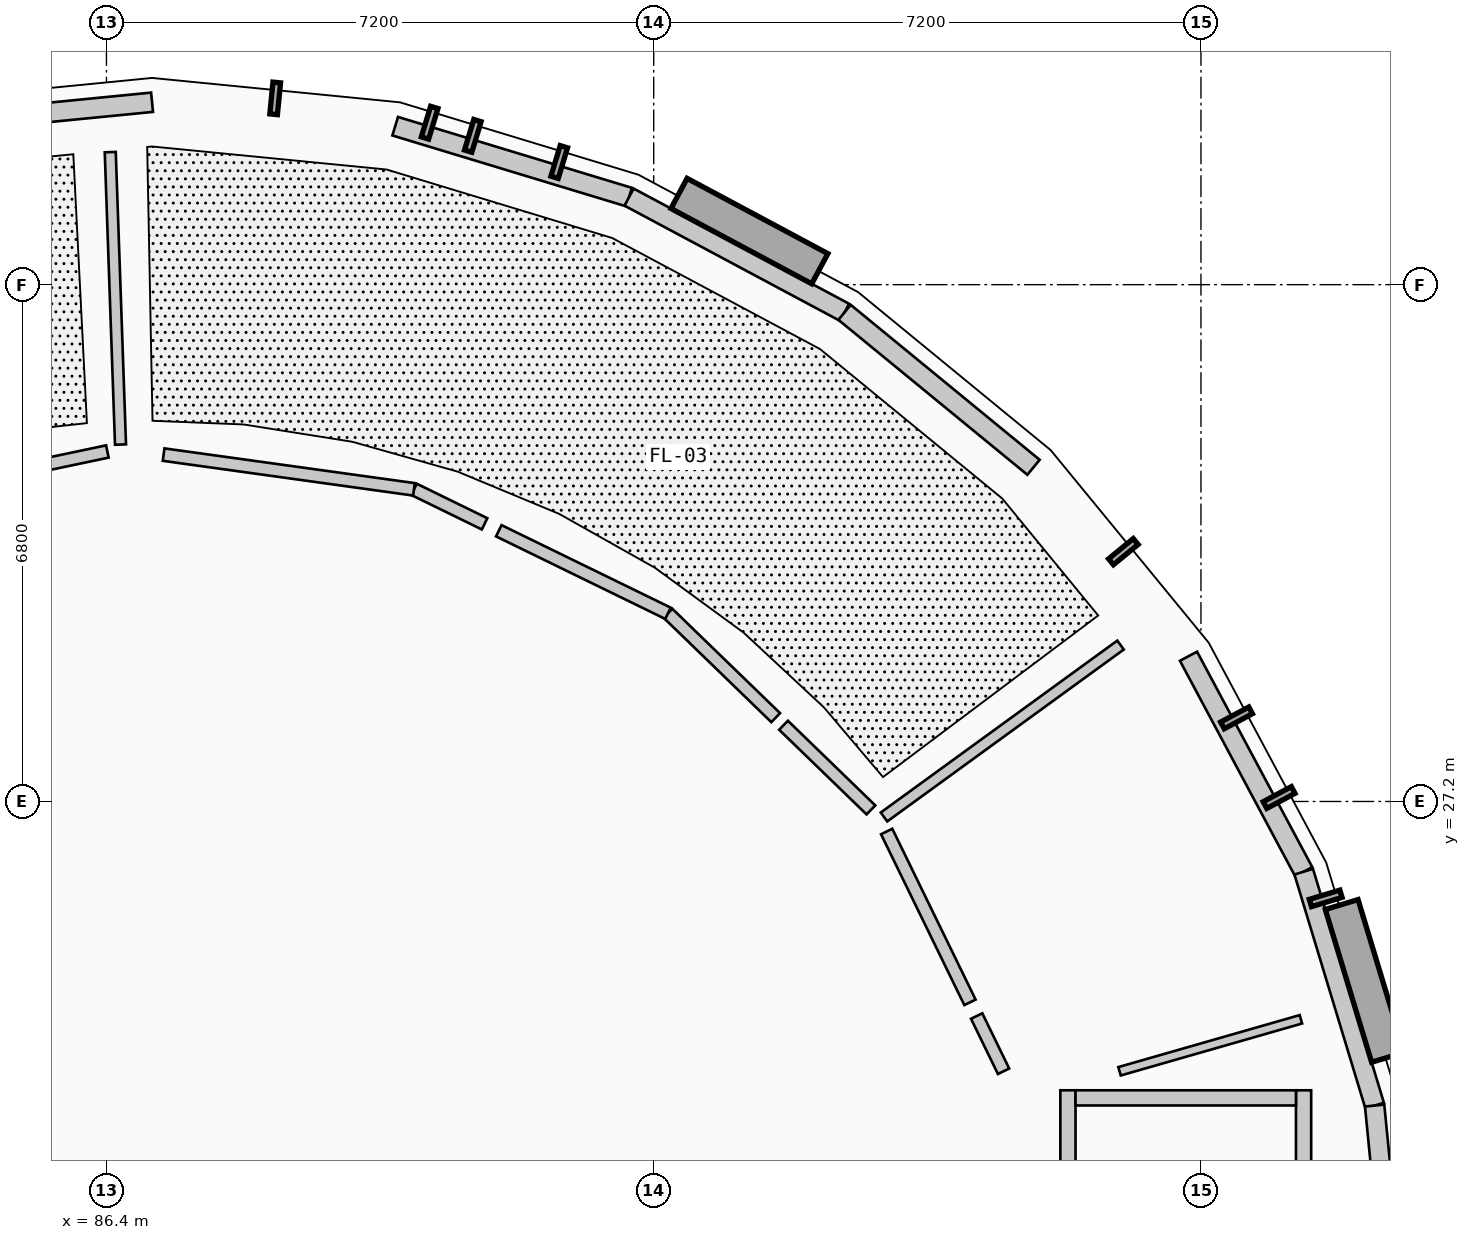
"""IFC4 building model, lengths in metres.
Left out: names, types, materials, properties, quantities, classifications, styles, units other than length and angle.
Written with IfcOpenShell. Run it as: python <this file> out.ifc"""

import sys

from ifc_helpers import new_model, si_unit, direction, frame, frame_2d, origin, origin_2d, place, context, subcontext, project, spatial, rectangle, circle, extrude, element, fill, save


model = new_model("IFC4")
c1 = context("Model", 3, precision=1e-05, world=origin(), true_north=direction((0.0, 1.0)))
c2 = subcontext(c1, "Body", "Model", "MODEL_VIEW")
j1 = project(units=[si_unit("LENGTHUNIT", "METRE"), si_unit("PLANEANGLEUNIT", "RADIAN")], contexts=[c1])
p1 = place(None, origin())
s1 = spatial("IfcSite", under=j1, at=p1, CompositionType="ELEMENT")
p2 = place(p1, origin())
s2 = spatial("IfcBuilding", under=s1, at=p2, CompositionType="ELEMENT")
p3 = place(p2, frame((0.0, 0.0, 4.55)))
s3 = spatial("IfcBuildingStorey", under=s2, at=p3, CompositionType="ELEMENT", Elevation=4.55)
for number, where, z_axis, x_axis in (
    (1, (101.671, 26.077, 0.0), (0.0, 0.0, 1.0), (1.0, 0.0, 0.0)),
    (2, (98.229, 31.229, 0.0), (0.0, 0.0, 1.0), (1.0, 0.0, 0.0)),
    (3, (93.077, 34.671, 0.0), (0.0, 0.0, 1.0), (1.0, 0.0, 0.0)),
    (4, (87.0, 35.88, 0.0), (0.0, 0.0, 1.0), (1.0, 0.0, 0.0)),
    (5, (97.92, 24.523, 0.0), (0.0, 0.0, 1.0), (1.0, 0.0, 0.0)),
    (6, (95.358, 28.358, 0.0), (0.0, 0.0, 1.0), (1.0, 0.0, 0.0)),
    (7, (91.523, 30.92, 0.0), (0.0, 0.0, 1.0), (1.0, 0.0, 0.0)),
    (8, (87.0, 31.82, 0.0), (0.0, 0.0, 1.0), (1.0, 0.0, 0.0)),
):
    element("IfcColumn", number, at=place(p3, frame(where, z_axis=z_axis, x_axis=x_axis)), inside=s3, PredefinedType="COLUMN", context=c2, shape_type="SweptSolid", body=[
        extrude(rectangle(XDim=0.315, YDim=0.315, at=origin_2d()), origin(), (0.0, 0.0, 1.0), 4.2),
    ])
for number, where, z_axis, x_axis in (
    (9, (99.834, 32.834, 0.0), (0.0, 0.0, 1.0), (1.0, 0.0, 0.0)),
    (10, (93.946, 36.768, 0.0), (0.0, 0.0, 1.0), (1.0, 0.0, 0.0)),
):
    element("IfcColumn", number, at=place(p3, frame(where, z_axis=z_axis, x_axis=x_axis)), inside=s3, PredefinedType="COLUMN", context=c2, shape_type="SweptSolid", body=[
        extrude(circle(Radius=0.35, at=origin_2d()), origin(), (0.0, 0.0, 1.0), 4.2),
    ])
p4 = place(p3, frame((83.801, 36.085, 0.0), z_axis=(0.0, 0.0, 1.0), x_axis=(0.995188673637, 0.097977057849, 0.0)))
e11 = element("IfcWall", 11, at=p4, inside=s3, PredefinedType="ELEMENTEDWALL", context=c2, shape_type="SweptSolid", body=[
    extrude(rectangle(XDim=3.214, YDim=0.255, at=frame_2d((1.607, 0.0))), origin(), (0.0, 0.0, 1.0), 3.314),
])
p5 = place(p4, frame((1.117, 0.0, 0.85)))
e12 = element("IfcOpeningElement", 12, at=p5, cuts=e11, PredefinedType="OPENING", context=c2, shape_type="SweptSolid", body=[
    extrude(rectangle(XDim=0.98, YDim=1.75, at=frame_2d((0.49, 0.875))), frame((0.0, 0.137, 0.0), z_axis=(0.0, -1.0, 0.0), x_axis=(1.0, 0.0, 0.0)), (0.0, 0.0, 1.0), 0.275),
])
p6 = place(p3, frame((90.199, 36.085, 0.0), z_axis=(0.0, 0.0, 1.0), x_axis=(0.956984161567, -0.29014016356, 0.0)))
e13 = element("IfcWall", 13, at=p6, inside=s3, PredefinedType="ELEMENTEDWALL", context=c2, shape_type="SweptSolid", body=[
    extrude(rectangle(XDim=3.215, YDim=0.255, at=frame_2d((1.607, 0.0))), origin(), (0.0, 0.0, 1.0), 3.314),
])
p7 = place(p6, frame((1.108, 0.0, 0.85)))
e14 = element("IfcOpeningElement", 14, at=p7, cuts=e13, PredefinedType="OPENING", context=c2, shape_type="SweptSolid", body=[
    extrude(rectangle(XDim=1.0, YDim=1.45, at=frame_2d((0.5, 0.725))), frame((0.0, 0.137, 0.0), z_axis=(0.0, -1.0, 0.0), x_axis=(1.0, 0.0, 0.0)), (0.0, 0.0, 1.0), 0.275),
])
p8 = place(p3, frame((93.276, 35.152, 0.0), z_axis=(0.0, 0.0, 1.0), x_axis=(0.881835313523, -0.47155750426, 0.0)))
e15 = element("IfcWall", 15, at=p8, inside=s3, PredefinedType="ELEMENTEDWALL", context=c2, shape_type="SweptSolid", body=[
    extrude(rectangle(XDim=3.215, YDim=0.255, at=frame_2d((1.607, 0.0))), origin(), (0.0, 0.0, 1.0), 3.314),
])
p9 = place(p8, frame((1.107, 0.0, 0.85)))
e16 = element("IfcOpeningElement", 16, at=p9, cuts=e15, PredefinedType="OPENING", context=c2, shape_type="SweptSolid", body=[
    extrude(rectangle(XDim=1.0, YDim=1.75, at=frame_2d((0.5, 0.875))), frame((0.0, 0.137, 0.0), z_axis=(0.0, -1.0, 0.0), x_axis=(1.0, 0.0, 0.0)), (0.0, 0.0, 1.0), 0.275),
])
p10 = place(p3, frame((96.111, 33.636, 0.0), z_axis=(0.0, 0.0, 1.0), x_axis=(0.773165020866, -0.634204896314, 0.0)))
e17 = element("IfcWall", 17, at=p10, inside=s3, PredefinedType="ELEMENTEDWALL", context=c2, shape_type="SweptSolid", body=[
    extrude(rectangle(XDim=3.215, YDim=0.255, at=frame_2d((1.607, 0.0))), origin(), (0.0, 0.0, 1.0), 3.314),
])
p11 = place(p10, frame((1.108, 0.0, 0.85)))
e18 = element("IfcOpeningElement", 18, at=p11, cuts=e17, PredefinedType="OPENING", context=c2, shape_type="SweptSolid", body=[
    extrude(rectangle(XDim=1.0, YDim=2.0, at=frame_2d((0.5, 1.0))), frame((0.0, 0.137, 0.0), z_axis=(0.0, -1.0, 0.0), x_axis=(1.0, 0.0, 0.0)), (0.0, 0.0, 1.0), 0.275),
])
p12 = place(p3, frame((100.636, 29.111, 0.0), z_axis=(0.0, 0.0, 1.0), x_axis=(0.47155750426, -0.881835313523, 0.0)))
e19 = element("IfcWall", 19, at=p12, inside=s3, PredefinedType="ELEMENTEDWALL", context=c2, shape_type="SweptSolid", body=[
    extrude(rectangle(XDim=3.215, YDim=0.255, at=frame_2d((1.607, 0.0))), origin(), (0.0, 0.0, 1.0), 3.314),
])
p13 = place(p12, frame((1.097, 0.0, 0.85)))
e20 = element("IfcOpeningElement", 20, at=p13, cuts=e19, PredefinedType="OPENING", context=c2, shape_type="SweptSolid", body=[
    extrude(rectangle(XDim=1.02, YDim=1.6, at=frame_2d((0.51, 0.8))), frame((0.0, 0.137, 0.0), z_axis=(0.0, -1.0, 0.0), x_axis=(1.0, 0.0, 0.0)), (0.0, 0.0, 1.0), 0.275),
])
p14 = place(p3, frame((102.152, 26.276, 0.0), z_axis=(0.0, 0.0, 1.0), x_axis=(0.29014016356, -0.956984161567, 0.0)))
e21 = element("IfcWall", 21, at=p14, inside=s3, PredefinedType="ELEMENTEDWALL", context=c2, shape_type="SweptSolid", body=[
    extrude(rectangle(XDim=3.215, YDim=0.255, at=frame_2d((1.607, 0.0))), origin(), (0.0, 0.0, 1.0), 3.314),
])
p15 = place(p14, frame((1.083, 0.0, 0.85)))
e22 = element("IfcOpeningElement", 22, at=p15, cuts=e21, PredefinedType="OPENING", context=c2, shape_type="SweptSolid", body=[
    extrude(rectangle(XDim=1.05, YDim=1.35, at=frame_2d((0.525, 0.675))), frame((0.0, 0.137, 0.0), z_axis=(0.0, -1.0, 0.0), x_axis=(1.0, 0.0, 0.0)), (0.0, 0.0, 1.0), 0.275),
])
p16 = place(p3, frame((103.085, 23.199, 0.0), z_axis=(0.0, 0.0, 1.0), x_axis=(0.097977057849, -0.995188673637, 0.0)))
e23 = element("IfcWall", 23, at=p16, inside=s3, PredefinedType="ELEMENTEDWALL", context=c2, shape_type="SweptSolid", body=[
    extrude(rectangle(XDim=3.214, YDim=0.255, at=frame_2d((1.607, 0.0))), origin(), (0.0, 0.0, 1.0), 3.314),
])
p17 = place(p3, frame((99.05, 23.4, 0.0), z_axis=(0.0, 0.0, 1.0), x_axis=(0.0, -1.0, 0.0)))
e24 = element("IfcWall", 24, at=p17, inside=s3, PredefinedType="SHEAR", context=c2, shape_type="SweptSolid", body=[
    extrude(rectangle(XDim=6.8, YDim=0.2, at=frame_2d((3.4, 0.0))), origin(), (0.0, 0.0, 1.0), 3.3),
])
p18 = place(p17, frame((0.38, 0.0, 0.0)))
e25 = element("IfcOpeningElement", 25, at=p18, cuts=e24, PredefinedType="OPENING", context=c2, shape_type="SweptSolid", body=[
    extrude(rectangle(XDim=1.1, YDim=2.15, at=frame_2d((0.55, 1.075))), frame((0.0, 0.11, 0.0), z_axis=(0.0, -1.0, 0.0), x_axis=(1.0, 0.0, 0.0)), (0.0, 0.0, 1.0), 0.22),
])
p19 = place(p3, frame((102.15, 23.4, 0.0), z_axis=(0.0, 0.0, 1.0), x_axis=(0.0, -1.0, 0.0)))
e26 = element("IfcWall", 26, at=p19, inside=s3, PredefinedType="SHEAR", context=c2, shape_type="SweptSolid", body=[
    extrude(rectangle(XDim=6.8, YDim=0.2, at=frame_2d((3.4, 0.0))), origin(), (0.0, 0.0, 1.0), 3.3),
])
p20 = place(p3, frame((99.15, 23.3, 0.0), z_axis=(0.0, 0.0, 1.0), x_axis=(1.0, 0.0, 0.0)))
e27 = element("IfcWall", 27, at=p20, inside=s3, PredefinedType="SHEAR", context=c2, shape_type="SweptSolid", body=[
    extrude(rectangle(XDim=2.9, YDim=0.2, at=frame_2d((1.45, 0.0))), origin(), (0.0, 0.0, 1.0), 3.3),
])
p21 = place(p3, frame((96.63, 26.996, 0.0), z_axis=(0.0, 0.0, 1.0), x_axis=(0.808903444358, 0.587941508745, 0.0)))
e28 = element("IfcWall", 28, at=p21, inside=s3, PredefinedType="PARTITIONING", context=c2, shape_type="SweptSolid", body=[
    extrude(rectangle(XDim=3.847, YDim=0.145, at=frame_2d((1.924, 0.0))), origin(), (0.0, 0.0, 1.0), 3.3),
])
p22 = place(p3, frame((86.585, 31.896, 0.0), z_axis=(0.0, 0.0, 1.0), x_axis=(-0.035065029067, 0.999385032776, 0.0)))
e29 = element("IfcWall", 29, at=p22, inside=s3, PredefinedType="PARTITIONING", context=c2, shape_type="SweptSolid", body=[
    extrude(rectangle(XDim=3.85, YDim=0.145, at=frame_2d((1.925, 0.0))), origin(), (0.0, 0.0, 1.0), 3.3),
])
p23 = place(p3, frame((99.729, 23.65, 0.0), z_axis=(0.0, 0.0, 1.0), x_axis=(0.96127114667, 0.275604395065, 0.0)))
e30 = element("IfcWall", 30, at=p23, inside=s3, PredefinedType="PARTITIONING", context=c2, shape_type="SweptSolid", body=[
    extrude(rectangle(XDim=2.482, YDim=0.115, at=frame_2d((1.241, 0.0))), origin(), (0.0, 0.0, 1.0), 3.3),
])
p24 = place(p3, frame((96.458, 27.089, 0.0), z_axis=(0.0, 0.0, 1.0), x_axis=(-0.718302144199, 0.69573129126, 0.0)))
e31 = element("IfcWall", 31, at=p24, inside=s3, PredefinedType="PARTITIONING", context=c2, shape_type="SweptSolid", body=[
    extrude(rectangle(XDim=1.601, YDim=0.165, at=frame_2d((0.8, 0.0))), origin(), (0.0, 0.0, 1.0), 3.3),
])
p25 = place(p24, frame((0.311, 0.0, 0.0)))
e32 = element("IfcOpeningElement", 32, at=p25, cuts=e31, PredefinedType="OPENING", context=c2, shape_type="SweptSolid", body=[
    extrude(rectangle(XDim=0.98, YDim=2.24, at=frame_2d((0.49, 1.12))), frame((0.0, 0.093, 0.0), z_axis=(0.0, -1.0, 0.0), x_axis=(1.0, 0.0, 0.0)), (0.0, 0.0, 1.0), 0.185),
])
p26 = place(p3, frame((95.205, 28.303, 0.0), z_axis=(0.0, 0.0, 1.0), x_axis=(-0.718155192795, 0.695882977994, 0.0)))
e33 = element("IfcWall", 33, at=p26, inside=s3, PredefinedType="PARTITIONING", context=c2, shape_type="SweptSolid", body=[
    extrude(rectangle(XDim=1.973, YDim=0.165, at=frame_2d((0.987, 0.0))), origin(), (0.0, 0.0, 1.0), 3.3),
])
p27 = place(p3, frame((93.788, 29.676, 0.0), z_axis=(0.0, 0.0, 1.0), x_axis=(-0.898760866849, 0.438439168211, 0.0)))
e34 = element("IfcWall", 34, at=p27, inside=s3, PredefinedType="PARTITIONING", context=c2, shape_type="SweptSolid", body=[
    extrude(rectangle(XDim=2.477, YDim=0.165, at=frame_2d((1.238, 0.0))), origin(), (0.0, 0.0, 1.0), 3.3),
])
p28 = place(p3, frame((91.375, 30.853, 0.0), z_axis=(0.0, 0.0, 1.0), x_axis=(-0.89849821067, 0.438977180982, 0.0)))
e35 = element("IfcWall", 35, at=p28, inside=s3, PredefinedType="PARTITIONING", context=c2, shape_type="SweptSolid", body=[
    extrude(rectangle(XDim=1.034, YDim=0.165, at=frame_2d((0.517, 0.0))), origin(), (0.0, 0.0, 1.0), 3.3),
])
p29 = place(p3, frame((90.446, 31.307, 0.0), z_axis=(0.0, 0.0, 1.0), x_axis=(-0.990511159367, 0.137432322142, 0.0)))
e36 = element("IfcWall", 36, at=p29, inside=s3, PredefinedType="PARTITIONING", context=c2, shape_type="SweptSolid", body=[
    extrude(rectangle(XDim=3.325, YDim=0.165, at=frame_2d((1.663, 0.0))), origin(), (0.0, 0.0, 1.0), 3.3),
])
p30 = place(p3, frame((86.412, 31.805, 0.0), z_axis=(0.0, 0.0, 1.0), x_axis=(-0.978553268449, -0.20599393391, 0.0)))
e37 = element("IfcWall", 37, at=p30, inside=s3, PredefinedType="PARTITIONING", context=c2, shape_type="SweptSolid", body=[
    extrude(rectangle(XDim=3.718, YDim=0.165, at=frame_2d((1.859, 0.0))), origin(), (0.0, 0.0, 1.0), 3.3),
])
p31 = place(p30, frame((1.349, 0.0, 0.0)))
e38 = element("IfcOpeningElement", 38, at=p31, cuts=e37, PredefinedType="OPENING", context=c2, shape_type="SweptSolid", body=[
    extrude(rectangle(XDim=1.02, YDim=2.26, at=frame_2d((0.51, 1.13))), frame((0.0, 0.093, 0.0), z_axis=(0.0, -1.0, 0.0), x_axis=(1.0, 0.0, 0.0)), (0.0, 0.0, 1.0), 0.185),
])
p32 = place(p3, frame((98.203, 23.65, 0.0), z_axis=(0.0, 0.0, 1.0), x_axis=(-0.437525109064, 0.899206193784, 0.0)))
e39 = element("IfcWall", 39, at=p32, inside=s3, PredefinedType="PARTITIONING", context=c2, shape_type="SweptSolid", body=[
    extrude(rectangle(XDim=0.809, YDim=0.165, at=frame_2d((0.404, 0.0))), origin(), (0.0, 0.0, 1.0), 3.3),
])
p33 = place(p3, frame((97.761, 24.557, 0.0), z_axis=(0.0, 0.0, 1.0), x_axis=(-0.438210134554, 0.898872559362, 0.0)))
e40 = element("IfcWall", 40, at=p33, inside=s3, PredefinedType="PARTITIONING", context=c2, shape_type="SweptSolid", body=[
    extrude(rectangle(XDim=2.501, YDim=0.165, at=frame_2d((1.25, 0.0))), origin(), (0.0, 0.0, 1.0), 3.3),
])
p34 = place(p33, frame((0.776, 0.0, 0.0)))
e41 = element("IfcOpeningElement", 41, at=p34, cuts=e40, PredefinedType="OPENING", context=c2, shape_type="SweptSolid", body=[
    extrude(rectangle(XDim=0.95, YDim=2.16, at=frame_2d((0.475, 1.08))), frame((0.0, 0.093, 0.0), z_axis=(0.0, -1.0, 0.0), x_axis=(1.0, 0.0, 0.0)), (0.0, 0.0, 1.0), 0.185),
])
p35 = place(p5, origin())
e42 = element("IfcWindow", 42, at=p35, inside=s3, PartitioningType="SINGLE_PANEL", PredefinedType="WINDOW", context=c2, shape_type="SweptSolid", body=[
    extrude(rectangle(XDim=0.98, YDim=1.75, at=frame_2d((0.49, 0.875))), frame((0.0, 0.03, 0.0), z_axis=(0.0, -1.0, 0.0), x_axis=(1.0, 0.0, 0.0)), (0.0, 0.0, 1.0), 0.06),
])
fill(e12, e42)
p36 = place(p7, origin())
e43 = element("IfcWindow", 43, at=p36, inside=s3, PartitioningType="SINGLE_PANEL", PredefinedType="WINDOW", context=c2, shape_type="SweptSolid", body=[
    extrude(rectangle(XDim=1.0, YDim=1.45, at=frame_2d((0.5, 0.725))), frame((0.0, 0.03, 0.0), z_axis=(0.0, -1.0, 0.0), x_axis=(1.0, 0.0, 0.0)), (0.0, 0.0, 1.0), 0.06),
])
fill(e14, e43)
p37 = place(p9, origin())
e44 = element("IfcWindow", 44, at=p37, inside=s3, PartitioningType="SINGLE_PANEL", PredefinedType="WINDOW", context=c2, shape_type="SweptSolid", body=[
    extrude(rectangle(XDim=1.0, YDim=1.75, at=frame_2d((0.5, 0.875))), frame((0.0, 0.03, 0.0), z_axis=(0.0, -1.0, 0.0), x_axis=(1.0, 0.0, 0.0)), (0.0, 0.0, 1.0), 0.06),
])
fill(e16, e44)
p38 = place(p11, origin())
e45 = element("IfcWindow", 45, at=p38, inside=s3, PartitioningType="SINGLE_PANEL", PredefinedType="WINDOW", context=c2, shape_type="SweptSolid", body=[
    extrude(rectangle(XDim=1.0, YDim=2.0, at=frame_2d((0.5, 1.0))), frame((0.0, 0.03, 0.0), z_axis=(0.0, -1.0, 0.0), x_axis=(1.0, 0.0, 0.0)), (0.0, 0.0, 1.0), 0.06),
])
fill(e18, e45)
p39 = place(p13, origin())
e46 = element("IfcWindow", 46, at=p39, inside=s3, PartitioningType="SINGLE_PANEL", PredefinedType="WINDOW", context=c2, shape_type="SweptSolid", body=[
    extrude(rectangle(XDim=1.02, YDim=1.6, at=frame_2d((0.51, 0.8))), frame((0.0, 0.03, 0.0), z_axis=(0.0, -1.0, 0.0), x_axis=(1.0, 0.0, 0.0)), (0.0, 0.0, 1.0), 0.06),
])
fill(e20, e46)
p40 = place(p15, origin())
e47 = element("IfcWindow", 47, at=p40, inside=s3, PartitioningType="SINGLE_PANEL", PredefinedType="WINDOW", context=c2, shape_type="SweptSolid", body=[
    extrude(rectangle(XDim=1.05, YDim=1.35, at=frame_2d((0.525, 0.675))), frame((0.0, 0.03, 0.0), z_axis=(0.0, -1.0, 0.0), x_axis=(1.0, 0.0, 0.0)), (0.0, 0.0, 1.0), 0.06),
])
fill(e22, e47)
p41 = place(p18, origin())
e48 = element("IfcDoor", 48, at=p41, inside=s3, OperationType="SINGLE_SWING_RIGHT", PredefinedType="DOOR", context=c2, shape_type="SweptSolid", body=[
    extrude(rectangle(XDim=1.1, YDim=2.15, at=frame_2d((0.55, 1.075))), frame((0.0, 0.025, 0.0), z_axis=(0.0, -1.0, 0.0), x_axis=(1.0, 0.0, 0.0)), (0.0, 0.0, 1.0), 0.05),
])
fill(e25, e48)
p42 = place(p25, origin())
e49 = element("IfcDoor", 49, at=p42, inside=s3, OperationType="SINGLE_SWING_LEFT", PredefinedType="DOOR", context=c2, shape_type="SweptSolid", body=[
    extrude(rectangle(XDim=0.98, YDim=2.24, at=frame_2d((0.49, 1.12))), frame((0.0, 0.025, 0.0), z_axis=(0.0, -1.0, 0.0), x_axis=(1.0, 0.0, 0.0)), (0.0, 0.0, 1.0), 0.05),
])
fill(e32, e49)
p43 = place(p34, origin())
e50 = element("IfcDoor", 50, at=p43, inside=s3, OperationType="SINGLE_SWING_RIGHT", PredefinedType="DOOR", context=c2, shape_type="SweptSolid", body=[
    extrude(rectangle(XDim=0.95, YDim=2.16, at=frame_2d((0.475, 1.08))), frame((0.0, 0.025, 0.0), z_axis=(0.0, -1.0, 0.0), x_axis=(1.0, 0.0, 0.0)), (0.0, 0.0, 1.0), 0.05),
])
fill(e41, e50)
save(model, sys.argv[1])
